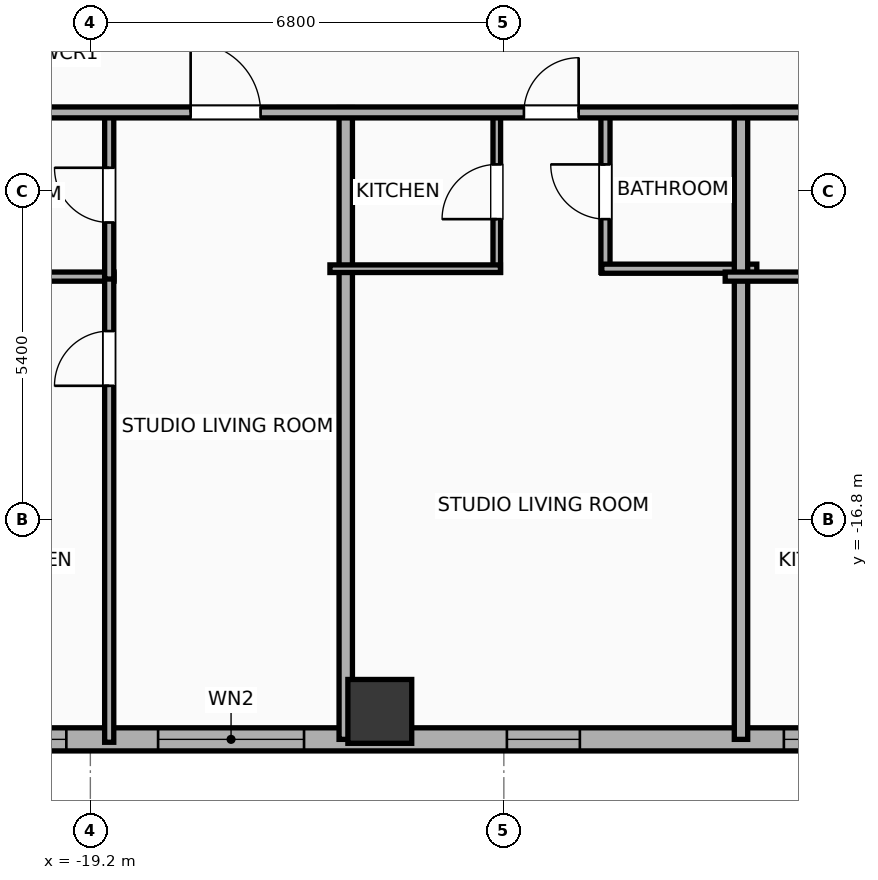
"""IFC4 building model, lengths in metres.
Left out: names, types, materials, properties, quantities, classifications, styles, units other than length and angle.
Written with IfcOpenShell. Run it as: python <this file> out.ifc"""

import sys

from ifc_helpers import new_model, si_unit, direction, frame, frame_2d, origin, origin_2d, place, context, subcontext, project, spatial, rectangle, hollow_rectangle, extrude, element, fill, save


model = new_model("IFC4")
c1 = context("Model", 3, precision=1e-05, world=origin(), true_north=direction((0.0, 1.0)))
c2 = subcontext(c1, "Body", "Model", "MODEL_VIEW")
j1 = project(units=[si_unit("LENGTHUNIT", "METRE"), si_unit("PLANEANGLEUNIT", "RADIAN")], contexts=[c1])
p1 = place(None, origin())
s1 = spatial("IfcSite", under=j1, at=p1, CompositionType="ELEMENT")
p2 = place(p1, origin())
s2 = spatial("IfcBuilding", under=s1, at=p2, CompositionType="ELEMENT")
p3 = place(p2, frame((0.0, 0.0, 128.7)))
s3 = spatial("IfcBuildingStorey", under=s2, at=p3, CompositionType="ELEMENT", Elevation=128.7)
p4 = place(p3, frame((-14.44, -19.95, 0.0), z_axis=(0.0, 0.0, 1.0), x_axis=(1.0, 0.0, 0.0)))
e1 = element("IfcColumn", 1, at=p4, inside=s3, PredefinedType="COLUMN", context=c2, shape_type="SweptSolid", body=[
    extrude(hollow_rectangle(XDim=1.05, YDim=1.05, WallThickness=0.036, at=origin_2d()), origin(), (0.0, 0.0, 1.0), 3.9),
])
p5 = place(p3, frame((29.381, -20.41, 0.0), z_axis=(0.0, 0.0, 1.0), x_axis=(-1.0, 0.0, 0.0)))
e2 = element("IfcWall", 2, at=p5, inside=s3, PredefinedType="ELEMENTEDWALL", context=c2, shape_type="SweptSolid", body=[
    extrude(rectangle(XDim=54.763, YDim=0.38, at=frame_2d((27.381, 0.0))), origin(), (0.0, 0.0, 1.0), 3.65),
])
p6 = place(p5, frame((45.067, 0.0, 0.75)))
e3 = element("IfcOpeningElement", 3, at=p6, cuts=e2, PredefinedType="OPENING", context=c2, shape_type="SweptSolid", body=[
    extrude(rectangle(XDim=2.4, YDim=2.1, at=frame_2d((1.2, 1.05))), frame((0.0, 0.2, 0.0), z_axis=(0.0, -1.0, 0.0), x_axis=(1.0, 0.0, 0.0)), (0.0, 0.0, 1.0), 0.4),
])
p7 = place(p5, frame((51.777, 0.0, 0.75)))
e4 = element("IfcOpeningElement", 4, at=p7, cuts=e2, PredefinedType="OPENING", context=c2, shape_type="SweptSolid", body=[
    extrude(rectangle(XDim=1.2, YDim=2.05, at=frame_2d((0.6, 1.025))), frame((0.0, 0.2, 0.0), z_axis=(0.0, -1.0, 0.0), x_axis=(1.0, 0.0, 0.0)), (0.0, 0.0, 1.0), 0.4),
])
p8 = place(p5, frame((48.976, 0.0, 0.75)))
e5 = element("IfcOpeningElement", 5, at=p8, cuts=e2, PredefinedType="OPENING", context=c2, shape_type="SweptSolid", body=[
    extrude(rectangle(XDim=1.2, YDim=2.05, at=frame_2d((0.6, 1.025))), frame((0.0, 0.2, 0.0), z_axis=(0.0, -1.0, 0.0), x_axis=(1.0, 0.0, 0.0)), (0.0, 0.0, 1.0), 0.4),
])
p9 = place(p5, frame((40.531, 0.0, 0.75)))
e6 = element("IfcOpeningElement", 6, at=p9, cuts=e2, PredefinedType="OPENING", context=c2, shape_type="SweptSolid", body=[
    extrude(rectangle(XDim=1.2, YDim=2.05, at=frame_2d((0.6, 1.025))), frame((0.0, 0.2, 0.0), z_axis=(0.0, -1.0, 0.0), x_axis=(1.0, 0.0, 0.0)), (0.0, 0.0, 1.0), 0.4),
])
p10 = place(p5, frame((33.686, 0.0, 0.75)))
e7 = element("IfcOpeningElement", 7, at=p10, cuts=e2, PredefinedType="OPENING", context=c2, shape_type="SweptSolid", body=[
    extrude(rectangle(XDim=1.2, YDim=2.05, at=frame_2d((0.6, 1.025))), frame((0.0, 0.2, 0.0), z_axis=(0.0, -1.0, 0.0), x_axis=(1.0, 0.0, 0.0)), (0.0, 0.0, 1.0), 0.4),
])
p11 = place(p5, frame((35.976, 0.0, 0.75)))
e8 = element("IfcOpeningElement", 8, at=p11, cuts=e2, PredefinedType="OPENING", context=c2, shape_type="SweptSolid", body=[
    extrude(rectangle(XDim=1.2, YDim=2.05, at=frame_2d((0.6, 1.025))), frame((0.0, 0.2, 0.0), z_axis=(0.0, -1.0, 0.0), x_axis=(1.0, 0.0, 0.0)), (0.0, 0.0, 1.0), 0.4),
])
p12 = place(p5, frame((28.805, 0.0, 0.75)))
e9 = element("IfcOpeningElement", 9, at=p12, cuts=e2, PredefinedType="OPENING", context=c2, shape_type="SweptSolid", body=[
    extrude(rectangle(XDim=1.2, YDim=2.05, at=frame_2d((0.6, 1.025))), frame((0.0, 0.2, 0.0), z_axis=(0.0, -1.0, 0.0), x_axis=(1.0, 0.0, 0.0)), (0.0, 0.0, 1.0), 0.4),
])
p13 = place(p5, frame((25.555, 0.0, 0.75)))
e10 = element("IfcOpeningElement", 10, at=p13, cuts=e2, PredefinedType="OPENING", context=c2, shape_type="SweptSolid", body=[
    extrude(rectangle(XDim=1.2, YDim=2.05, at=frame_2d((0.6, 1.025))), frame((0.0, 0.2, 0.0), z_axis=(0.0, -1.0, 0.0), x_axis=(1.0, 0.0, 0.0)), (0.0, 0.0, 1.0), 0.4),
])
p14 = place(p5, frame((19.951, 0.0, 0.75)))
e11 = element("IfcOpeningElement", 11, at=p14, cuts=e2, PredefinedType="OPENING", context=c2, shape_type="SweptSolid", body=[
    extrude(rectangle(XDim=1.2, YDim=2.05, at=frame_2d((0.6, 1.025))), frame((0.0, 0.2, 0.0), z_axis=(0.0, -1.0, 0.0), x_axis=(1.0, 0.0, 0.0)), (0.0, 0.0, 1.0), 0.4),
])
p15 = place(p5, frame((15.836, 0.0, 0.75)))
e12 = element("IfcOpeningElement", 12, at=p15, cuts=e2, PredefinedType="OPENING", context=c2, shape_type="SweptSolid", body=[
    extrude(rectangle(XDim=1.2, YDim=2.05, at=frame_2d((0.6, 1.025))), frame((0.0, 0.2, 0.0), z_axis=(0.0, -1.0, 0.0), x_axis=(1.0, 0.0, 0.0)), (0.0, 0.0, 1.0), 0.4),
])
p16 = place(p5, frame((12.586, 0.0, 0.75)))
e13 = element("IfcOpeningElement", 13, at=p16, cuts=e2, PredefinedType="OPENING", context=c2, shape_type="SweptSolid", body=[
    extrude(rectangle(XDim=1.2, YDim=2.05, at=frame_2d((0.6, 1.025))), frame((0.0, 0.2, 0.0), z_axis=(0.0, -1.0, 0.0), x_axis=(1.0, 0.0, 0.0)), (0.0, 0.0, 1.0), 0.4),
])
p17 = place(p5, frame((9.011, 0.0, 0.75)))
e14 = element("IfcOpeningElement", 14, at=p17, cuts=e2, PredefinedType="OPENING", context=c2, shape_type="SweptSolid", body=[
    extrude(rectangle(XDim=1.2, YDim=2.05, at=frame_2d((0.6, 1.025))), frame((0.0, 0.2, 0.0), z_axis=(0.0, -1.0, 0.0), x_axis=(1.0, 0.0, 0.0)), (0.0, 0.0, 1.0), 0.4),
])
p18 = place(p5, frame((6.001, 0.0, 0.75)))
e15 = element("IfcOpeningElement", 15, at=p18, cuts=e2, PredefinedType="OPENING", context=c2, shape_type="SweptSolid", body=[
    extrude(rectangle(XDim=1.2, YDim=2.05, at=frame_2d((0.6, 1.025))), frame((0.0, 0.2, 0.0), z_axis=(0.0, -1.0, 0.0), x_axis=(1.0, 0.0, 0.0)), (0.0, 0.0, 1.0), 0.4),
])
p19 = place(p5, frame((2.536, 0.0, 0.75)))
e16 = element("IfcOpeningElement", 16, at=p19, cuts=e2, PredefinedType="OPENING", context=c2, shape_type="SweptSolid", body=[
    extrude(rectangle(XDim=1.2, YDim=2.05, at=frame_2d((0.6, 1.025))), frame((0.0, 0.2, 0.0), z_axis=(0.0, -1.0, 0.0), x_axis=(1.0, 0.0, 0.0)), (0.0, 0.0, 1.0), 0.4),
])
p20 = place(p3, frame((-21.76, -12.8, 0.0), z_axis=(0.0, 0.0, 1.0), x_axis=(1.0, 0.0, 0.0)))
e17 = element("IfcWall", 17, at=p20, inside=s3, PredefinedType="PLUMBINGWALL", context=c2, shape_type="SweptSolid", body=[
    extrude(rectangle(XDim=2.95, YDim=0.15, at=frame_2d((1.475, 0.0))), origin(), (0.0, 0.0, 1.0), 3.65),
])
p21 = place(p3, frame((-18.89, -20.458, 0.0), z_axis=(0.0, 0.0, 1.0), x_axis=(0.0, 1.0, 0.0)))
e18 = element("IfcWall", 18, at=p21, inside=s3, PredefinedType="PLUMBINGWALL", context=c2, shape_type="SweptSolid", body=[
    extrude(rectangle(XDim=7.698, YDim=0.15, at=frame_2d((3.849, 0.0))), origin(), (0.0, 0.0, 1.0), 3.65),
])
p22 = place(p21, frame((5.862, 0.0, 0.0)))
e19 = element("IfcOpeningElement", 19, at=p22, cuts=e18, PredefinedType="OPENING", context=c2, shape_type="SweptSolid", body=[
    extrude(rectangle(XDim=0.9, YDim=2.05, at=frame_2d((0.45, 1.025))), frame((0.0, 0.085, 0.0), z_axis=(0.0, -1.0, 0.0), x_axis=(1.0, 0.0, 0.0)), (0.0, 0.0, 1.0), 0.17),
])
p23 = place(p3, frame((-18.89, -12.84, 0.0), z_axis=(0.0, 0.0, 1.0), x_axis=(0.0, 1.0, 0.0)))
e20 = element("IfcWall", 20, at=p23, inside=s3, PredefinedType="PLUMBINGWALL", context=c2, shape_type="SweptSolid", body=[
    extrude(rectangle(XDim=2.76, YDim=0.15, at=frame_2d((1.38, 0.0))), origin(), (0.0, 0.0, 1.0), 3.65),
])
p24 = place(p23, frame((0.93, 0.0, 0.0)))
e21 = element("IfcOpeningElement", 21, at=p24, cuts=e20, PredefinedType="OPENING", context=c2, shape_type="SweptSolid", body=[
    extrude(rectangle(XDim=0.9, YDim=2.05, at=frame_2d((0.45, 1.025))), frame((0.0, 0.085, 0.0), z_axis=(0.0, -1.0, 0.0), x_axis=(1.0, 0.0, 0.0)), (0.0, 0.0, 1.0), 0.17),
])
p25 = place(p3, frame((-15.0, -20.41, 0.0), z_axis=(0.0, 0.0, 1.0), x_axis=(0.0, 1.0, 0.0)))
e22 = element("IfcWall", 22, at=p25, inside=s3, PredefinedType="PARTITIONING", context=c2, shape_type="SweptSolid", body=[
    extrude(rectangle(XDim=10.39, YDim=0.22, at=frame_2d((5.195, 0.0))), origin(), (0.0, 0.0, 1.0), 3.04),
])
p26 = place(p3, frame((-12.516, -12.73, 0.0), z_axis=(0.0, 0.0, 1.0), x_axis=(0.0, 1.0, 0.0)))
e23 = element("IfcWall", 23, at=p26, inside=s3, PredefinedType="PARTITIONING", context=c2, shape_type="SweptSolid", body=[
    extrude(rectangle(XDim=2.65, YDim=0.125, at=frame_2d((1.325, 0.0))), origin(), (0.0, 0.0, 1.0), 3.65),
])
p27 = place(p26, frame((0.875, 0.0, 0.0)))
e24 = element("IfcOpeningElement", 24, at=p27, cuts=e23, PredefinedType="OPENING", context=c2, shape_type="SweptSolid", body=[
    extrude(rectangle(XDim=0.9, YDim=2.05, at=frame_2d((0.45, 1.025))), frame((0.0, 0.073, 0.0), z_axis=(0.0, -1.0, 0.0), x_axis=(1.0, 0.0, 0.0)), (0.0, 0.0, 1.0), 0.145),
])
p28 = place(p3, frame((-10.729, -12.73, 0.0), z_axis=(0.0, 0.0, 1.0), x_axis=(0.0, 1.0, 0.0)))
e25 = element("IfcWall", 25, at=p28, inside=s3, PredefinedType="PLUMBINGWALL", context=c2, shape_type="SweptSolid", body=[
    extrude(rectangle(XDim=2.65, YDim=0.15, at=frame_2d((1.325, 0.0))), origin(), (0.0, 0.0, 1.0), 3.65),
])
p29 = place(p28, frame((0.875, 0.0, 0.0)))
e26 = element("IfcOpeningElement", 26, at=p29, cuts=e25, PredefinedType="OPENING", context=c2, shape_type="SweptSolid", body=[
    extrude(rectangle(XDim=0.9, YDim=2.05, at=frame_2d((0.45, 1.025))), frame((0.0, 0.085, 0.0), z_axis=(0.0, -1.0, 0.0), x_axis=(1.0, 0.0, 0.0)), (0.0, 0.0, 1.0), 0.17),
])
p30 = place(p3, frame((-15.26, -12.67, 0.0), z_axis=(0.0, 0.0, 1.0), x_axis=(1.0, 0.0, 0.0)))
e27 = element("IfcWall", 27, at=p30, inside=s3, PredefinedType="PARTITIONING", context=c2, shape_type="SweptSolid", body=[
    extrude(rectangle(XDim=2.804, YDim=0.125, at=frame_2d((1.402, 0.0))), origin(), (0.0, 0.0, 1.0), 3.65),
])
p31 = place(p3, frame((-10.789, -12.67, 0.0), z_axis=(0.0, 0.0, 1.0), x_axis=(1.0, 0.0, 0.0)))
e28 = element("IfcWall", 28, at=p31, inside=s3, PredefinedType="PLUMBINGWALL", context=c2, shape_type="SweptSolid", body=[
    extrude(rectangle(XDim=2.549, YDim=0.15, at=frame_2d((1.274, 0.0))), origin(), (0.0, 0.0, 1.0), 3.65),
])
p32 = place(p3, frame((-8.5, -20.41, 0.0), z_axis=(0.0, 0.0, 1.0), x_axis=(0.0, 1.0, 0.0)))
e29 = element("IfcWall", 29, at=p32, inside=s3, PredefinedType="PARTITIONING", context=c2, shape_type="SweptSolid", body=[
    extrude(rectangle(XDim=10.39, YDim=0.22, at=frame_2d((5.195, 0.0))), origin(), (0.0, 0.0, 1.0), 3.65),
])
p33 = place(p3, frame((-8.76, -12.8, 0.0), z_axis=(0.0, 0.0, 1.0), x_axis=(1.0, 0.0, 0.0)))
e30 = element("IfcWall", 30, at=p33, inside=s3, PredefinedType="PLUMBINGWALL", context=c2, shape_type="SweptSolid", body=[
    extrude(rectangle(XDim=2.95, YDim=0.15, at=frame_2d((1.475, 0.0))), origin(), (0.0, 0.0, 1.0), 3.65),
])
p34 = place(p3, frame((-29.21, -10.1, 0.0), z_axis=(0.0, 0.0, 1.0), x_axis=(1.0, 0.0, 0.0)))
e31 = element("IfcWall", 31, at=p34, inside=s3, PredefinedType="PARTITIONING", context=c2, shape_type="SweptSolid", body=[
    extrude(rectangle(XDim=62.42, YDim=0.18, at=frame_2d((31.21, 0.0))), origin(), (0.0, 0.0, 1.0), 3.65),
])
p35 = place(p34, frame((3.414, 0.0, 0.0)))
e32 = element("IfcOpeningElement", 32, at=p35, cuts=e31, PredefinedType="OPENING", context=c2, shape_type="SweptSolid", body=[
    extrude(rectangle(XDim=1.15, YDim=2.05, at=frame_2d((0.575, 1.025))), frame((0.0, 0.1, 0.0), z_axis=(0.0, -1.0, 0.0), x_axis=(1.0, 0.0, 0.0)), (0.0, 0.0, 1.0), 0.2),
])
p36 = place(p34, frame((11.659, 0.0, 0.0)))
e33 = element("IfcOpeningElement", 33, at=p36, cuts=e31, PredefinedType="OPENING", context=c2, shape_type="SweptSolid", body=[
    extrude(rectangle(XDim=1.15, YDim=2.05, at=frame_2d((0.575, 1.025))), frame((0.0, 0.1, 0.0), z_axis=(0.0, -1.0, 0.0), x_axis=(1.0, 0.0, 0.0)), (0.0, 0.0, 1.0), 0.2),
])
p37 = place(p34, frame((17.14, 0.0, 0.0)))
e34 = element("IfcOpeningElement", 34, at=p37, cuts=e31, PredefinedType="OPENING", context=c2, shape_type="SweptSolid", body=[
    extrude(rectangle(XDim=0.9, YDim=2.05, at=frame_2d((0.45, 1.025))), frame((0.0, 0.1, 0.0), z_axis=(0.0, -1.0, 0.0), x_axis=(1.0, 0.0, 0.0)), (0.0, 0.0, 1.0), 0.2),
])
p38 = place(p34, frame((24.661, 0.0, 0.0)))
e35 = element("IfcOpeningElement", 35, at=p38, cuts=e31, PredefinedType="OPENING", context=c2, shape_type="SweptSolid", body=[
    extrude(rectangle(XDim=1.15, YDim=2.05, at=frame_2d((0.575, 1.025))), frame((0.0, 0.1, 0.0), z_axis=(0.0, -1.0, 0.0), x_axis=(1.0, 0.0, 0.0)), (0.0, 0.0, 1.0), 0.2),
])
p39 = place(p34, frame((28.644, 0.0, 0.0)))
e36 = element("IfcOpeningElement", 36, at=p39, cuts=e31, PredefinedType="OPENING", context=c2, shape_type="SweptSolid", body=[
    extrude(rectangle(XDim=1.15, YDim=2.05, at=frame_2d((0.575, 1.025))), frame((0.0, 0.1, 0.0), z_axis=(0.0, -1.0, 0.0), x_axis=(1.0, 0.0, 0.0)), (0.0, 0.0, 1.0), 0.2),
])
p40 = place(p34, frame((36.64, 0.0, 0.0)))
e37 = element("IfcOpeningElement", 37, at=p40, cuts=e31, PredefinedType="OPENING", context=c2, shape_type="SweptSolid", body=[
    extrude(rectangle(XDim=0.9, YDim=2.05, at=frame_2d((0.45, 1.025))), frame((0.0, 0.1, 0.0), z_axis=(0.0, -1.0, 0.0), x_axis=(1.0, 0.0, 0.0)), (0.0, 0.0, 1.0), 0.2),
])
p41 = place(p34, frame((41.608, 0.0, 0.0)))
e38 = element("IfcOpeningElement", 38, at=p41, cuts=e31, PredefinedType="OPENING", context=c2, shape_type="SweptSolid", body=[
    extrude(rectangle(XDim=1.15, YDim=2.05, at=frame_2d((0.575, 1.025))), frame((0.0, 0.1, 0.0), z_axis=(0.0, -1.0, 0.0), x_axis=(1.0, 0.0, 0.0)), (0.0, 0.0, 1.0), 0.2),
])
p42 = place(p34, frame((48.194, 0.0, 0.0)))
e39 = element("IfcOpeningElement", 39, at=p42, cuts=e31, PredefinedType="OPENING", context=c2, shape_type="SweptSolid", body=[
    extrude(rectangle(XDim=1.15, YDim=2.05, at=frame_2d((0.575, 1.025))), frame((0.0, 0.1, 0.0), z_axis=(0.0, -1.0, 0.0), x_axis=(1.0, 0.0, 0.0)), (0.0, 0.0, 1.0), 0.2),
])
p43 = place(p34, frame((57.525, 0.0, 0.0)))
e40 = element("IfcOpeningElement", 40, at=p43, cuts=e31, PredefinedType="OPENING", context=c2, shape_type="SweptSolid", body=[
    extrude(rectangle(XDim=1.15, YDim=2.05, at=frame_2d((0.575, 1.025))), frame((0.0, 0.1, 0.0), z_axis=(0.0, -1.0, 0.0), x_axis=(1.0, 0.0, 0.0)), (0.0, 0.0, 1.0), 0.2),
])
p44 = place(p6, origin())
e41 = element("IfcWindow", 41, at=p44, inside=s3, PartitioningType="SINGLE_PANEL", PredefinedType="WINDOW", context=c2, shape_type="SweptSolid", body=[
    extrude(rectangle(XDim=2.4, YDim=2.1, at=frame_2d((1.2, 1.05))), frame((0.0, 0.03, 0.0), z_axis=(0.0, -1.0, 0.0), x_axis=(1.0, 0.0, 0.0)), (0.0, 0.0, 1.0), 0.06),
])
fill(e3, e41)
p45 = place(p8, origin())
e42 = element("IfcWindow", 42, at=p45, inside=s3, PartitioningType="SINGLE_PANEL", PredefinedType="WINDOW", context=c2, shape_type="SweptSolid", body=[
    extrude(rectangle(XDim=1.2, YDim=2.05, at=frame_2d((0.6, 1.025))), frame((0.0, 0.03, 0.0), z_axis=(0.0, -1.0, 0.0), x_axis=(1.0, 0.0, 0.0)), (0.0, 0.0, 1.0), 0.06),
])
fill(e5, e42)
p46 = place(p9, origin())
e43 = element("IfcWindow", 43, at=p46, inside=s3, PartitioningType="SINGLE_PANEL", PredefinedType="WINDOW", context=c2, shape_type="SweptSolid", body=[
    extrude(rectangle(XDim=1.2, YDim=2.05, at=frame_2d((0.6, 1.025))), frame((0.0, 0.03, 0.0), z_axis=(0.0, -1.0, 0.0), x_axis=(1.0, 0.0, 0.0)), (0.0, 0.0, 1.0), 0.06),
])
fill(e6, e43)
p47 = place(p11, origin())
e44 = element("IfcWindow", 44, at=p47, inside=s3, PartitioningType="SINGLE_PANEL", PredefinedType="WINDOW", context=c2, shape_type="SweptSolid", body=[
    extrude(rectangle(XDim=1.2, YDim=2.05, at=frame_2d((0.6, 1.025))), frame((0.0, 0.03, 0.0), z_axis=(0.0, -1.0, 0.0), x_axis=(1.0, 0.0, 0.0)), (0.0, 0.0, 1.0), 0.06),
])
fill(e8, e44)
p48 = place(p22, origin())
e45 = element("IfcDoor", 45, at=p48, inside=s3, OperationType="SINGLE_SWING_LEFT", PredefinedType="DOOR", context=c2, shape_type="SweptSolid", body=[
    extrude(rectangle(XDim=0.9, YDim=2.05, at=frame_2d((0.45, 1.025))), frame((0.0, 0.025, 0.0), z_axis=(0.0, -1.0, 0.0), x_axis=(1.0, 0.0, 0.0)), (0.0, 0.0, 1.0), 0.05),
])
fill(e19, e45)
p49 = place(p24, origin())
e46 = element("IfcDoor", 46, at=p49, inside=s3, OperationType="SINGLE_SWING_RIGHT", PredefinedType="DOOR", context=c2, shape_type="SweptSolid", body=[
    extrude(rectangle(XDim=0.9, YDim=2.05, at=frame_2d((0.45, 1.025))), frame((0.0, 0.025, 0.0), z_axis=(0.0, -1.0, 0.0), x_axis=(1.0, 0.0, 0.0)), (0.0, 0.0, 1.0), 0.05),
])
fill(e21, e46)
p50 = place(p27, origin())
e47 = element("IfcDoor", 47, at=p50, inside=s3, OperationType="SINGLE_SWING_LEFT", PredefinedType="DOOR", context=c2, shape_type="SweptSolid", body=[
    extrude(rectangle(XDim=0.9, YDim=2.05, at=frame_2d((0.45, 1.025))), frame((0.0, 0.025, 0.0), z_axis=(0.0, -1.0, 0.0), x_axis=(1.0, 0.0, 0.0)), (0.0, 0.0, 1.0), 0.05),
])
fill(e24, e47)
p51 = place(p29, origin())
e48 = element("IfcDoor", 48, at=p51, inside=s3, OperationType="SINGLE_SWING_RIGHT", PredefinedType="DOOR", context=c2, shape_type="SweptSolid", body=[
    extrude(rectangle(XDim=0.9, YDim=2.05, at=frame_2d((0.45, 1.025))), frame((0.0, 0.025, 0.0), z_axis=(0.0, -1.0, 0.0), x_axis=(1.0, 0.0, 0.0)), (0.0, 0.0, 1.0), 0.05),
])
fill(e26, e48)
p52 = place(p36, origin())
e49 = element("IfcDoor", 49, at=p52, inside=s3, OperationType="SINGLE_SWING_LEFT", PredefinedType="DOOR", context=c2, shape_type="SweptSolid", body=[
    extrude(rectangle(XDim=1.15, YDim=2.05, at=frame_2d((0.575, 1.025))), frame((0.0, 0.025, 0.0), z_axis=(0.0, -1.0, 0.0), x_axis=(1.0, 0.0, 0.0)), (0.0, 0.0, 1.0), 0.05),
])
fill(e33, e49)
p53 = place(p37, origin())
e50 = element("IfcDoor", 50, at=p53, inside=s3, OperationType="SINGLE_SWING_RIGHT", PredefinedType="DOOR", context=c2, shape_type="SweptSolid", body=[
    extrude(rectangle(XDim=0.9, YDim=2.05, at=frame_2d((0.45, 1.025))), frame((0.0, 0.025, 0.0), z_axis=(0.0, -1.0, 0.0), x_axis=(1.0, 0.0, 0.0)), (0.0, 0.0, 1.0), 0.05),
])
fill(e34, e50)
save(model, sys.argv[1])
